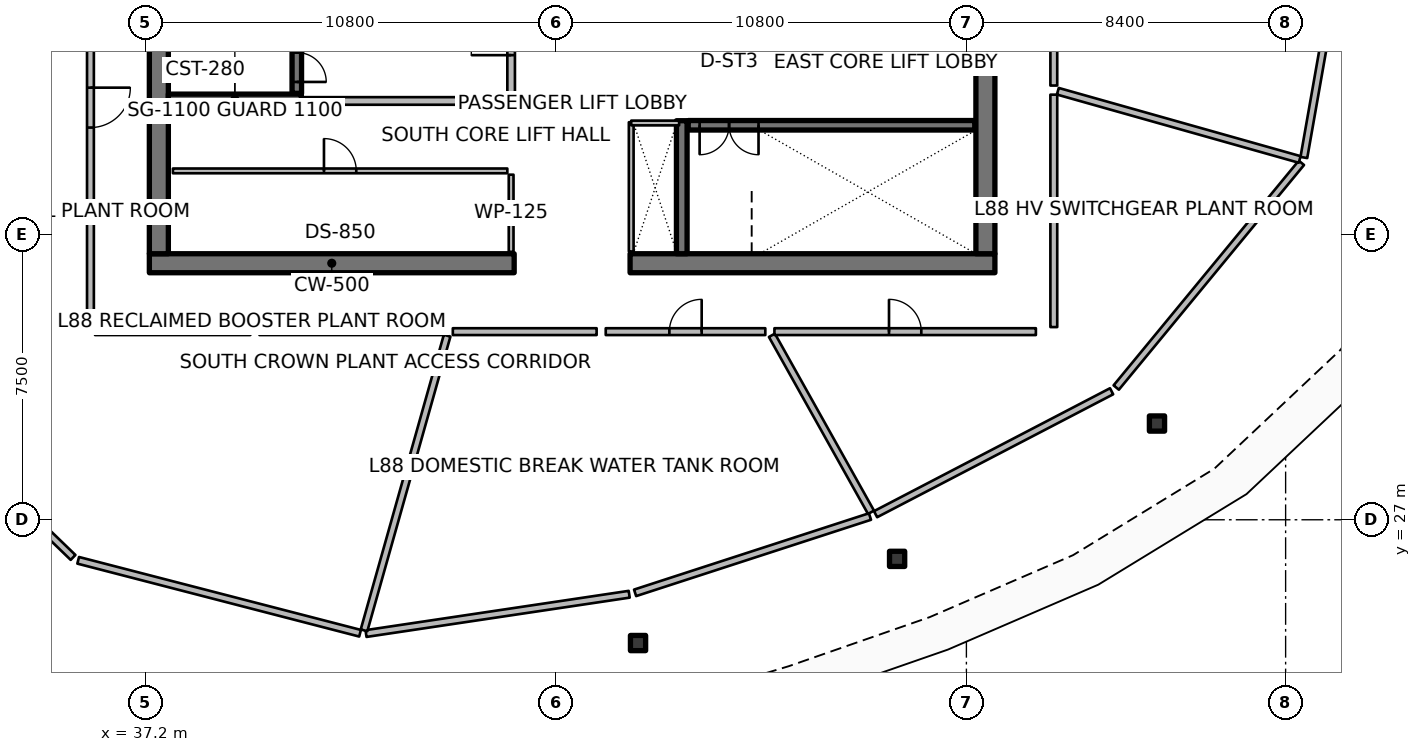
"""IFC4 building model, lengths in metres.
Left out: names, types, materials, properties, quantities, classifications, styles, units other than length and angle.
Written with IfcOpenShell. Run it as: python <this file> out.ifc"""

import sys

from ifc_helpers import new_model, si_unit, direction, frame, frame_2d, origin, origin_2d, place, context, subcontext, project, spatial, rectangle, hollow_rectangle, extrude, element, fill, save


model = new_model("IFC4")
c1 = context("Model", 3, precision=1e-05, world=origin(), true_north=direction((0.0, 1.0)))
c2 = subcontext(c1, "Body", "Model", "MODEL_VIEW")
j1 = project(units=[si_unit("LENGTHUNIT", "METRE"), si_unit("PLANEANGLEUNIT", "RADIAN")], contexts=[c1])
p1 = place(None, origin())
s1 = spatial("IfcSite", under=j1, at=p1, CompositionType="ELEMENT")
p2 = place(p1, origin())
s2 = spatial("IfcBuilding", under=s1, at=p2, CompositionType="ELEMENT")
p3 = place(p2, frame((0.0, 0.0, 351.5)))
s3 = spatial("IfcBuildingStorey", under=s2, at=p3, CompositionType="ELEMENT", Elevation=351.5)
p4 = place(p3, frame((37.3, 33.75, 0.0), z_axis=(0.0, 0.0, 1.0), x_axis=(1.0, 0.0, 0.0)))
e1 = element("IfcWall", 1, at=p4, inside=s3, PredefinedType="SHEAR", context=c2, shape_type="SweptSolid", body=[
    extrude(rectangle(XDim=9.6, YDim=0.5, at=frame_2d((4.8, 0.0))), origin(), (0.0, 0.0, 1.0), 4.5),
])
p5 = place(p3, frame((49.95, 33.75, 0.0), z_axis=(0.0, 0.0, 1.0), x_axis=(1.0, 0.0, 0.0)))
e2 = element("IfcWall", 2, at=p5, inside=s3, PredefinedType="SHEAR", context=c2, shape_type="SweptSolid", body=[
    extrude(rectangle(XDim=9.6, YDim=0.5, at=frame_2d((4.8, 0.0))), origin(), (0.0, 0.0, 1.0), 4.5),
])
for number, where, z_axis, x_axis in (
    (3, (37.55, 34.0, 0.0), (0.0, 0.0, 1.0), (0.0, 1.0, 0.0)),
    (4, (59.3, 34.0, 0.0), (0.0, 0.0, 1.0), (0.0, 1.0, 0.0)),
):
    element("IfcWall", number, at=place(p3, frame(where, z_axis=z_axis, x_axis=x_axis)), inside=s3, PredefinedType="SHEAR", context=c2, shape_type="SweptSolid", body=[
        extrude(rectangle(XDim=16.0, YDim=0.5, at=frame_2d((8.0, 0.0))), origin(), (0.0, 0.0, 1.0), 4.5),
    ])
for number, where, z_axis, x_axis in (
    (5, (37.8, 38.06, 0.0), (0.0, 0.0, 1.0), (1.0, 0.0, 0.0)),
    (6, (51.31, 34.0, 0.0), (0.0, 0.0, 1.0), (0.0, 1.0, 0.0)),
):
    element("IfcWall", number, at=place(p3, frame(where, z_axis=z_axis, x_axis=x_axis)), inside=s3, PredefinedType="SHEAR", context=c2, shape_type="SweptSolid", body=[
        extrude(rectangle(XDim=3.5, YDim=0.28, at=frame_2d((1.75, 0.0))), origin(), (0.0, 0.0, 1.0), 4.5),
    ])
for number, where, z_axis, x_axis in (
    (7, (50.159, 23.756, 0.0), (0.0, 0.0, 1.0), (1.0, 0.0, 0.0)),
    (8, (56.977, 25.971, 0.0), (0.0, 0.0, 1.0), (1.0, 0.0, 0.0)),
    (9, (63.815, 29.532, 0.0), (0.0, 0.0, 1.0), (1.0, 0.0, 0.0)),
):
    element("IfcColumn", number, at=place(p3, frame(where, z_axis=z_axis, x_axis=x_axis)), inside=s3, PredefinedType="COLUMN", context=c2, shape_type="SweptSolid", body=[
        extrude(hollow_rectangle(XDim=0.4, YDim=0.4, WallThickness=0.02, InnerFilletRadius=0.02, OuterFilletRadius=0.04, at=origin_2d()), origin(), (0.0, 0.0, 1.0), 4.22),
    ])
p6 = place(p3, frame((41.18, 38.22, 0.0), z_axis=(0.0, 0.0, 1.0), x_axis=(0.0, 1.0, 0.0)))
e10 = element("IfcWall", 10, at=p6, inside=s3, PredefinedType="SOLIDWALL", context=c2, shape_type="SweptSolid", body=[
    extrude(rectangle(XDim=7.56, YDim=0.25, at=frame_2d((3.78, 0.0))), origin(), (0.0, 0.0, 1.0), 4.22),
])
p7 = place(p6, frame((0.3, 0.0, 0.0)))
e11 = element("IfcOpeningElement", 11, at=p7, cuts=e10, PredefinedType="OPENING", context=c2, shape_type="SweptSolid", body=[
    extrude(rectangle(XDim=1.55, YDim=2.15, at=frame_2d((0.775, 1.075))), frame((0.0, 0.135, 0.0), z_axis=(0.0, -1.0, 0.0), x_axis=(1.0, 0.0, 0.0)), (0.0, 0.0, 1.0), 0.27),
])
p8 = place(p3, frame((51.48, 37.38, 0.0), z_axis=(0.0, 0.0, 1.0), x_axis=(1.0, 0.0, 0.0)))
e12 = element("IfcWall", 12, at=p8, inside=s3, PredefinedType="SOLIDWALL", context=c2, shape_type="SweptSolid", body=[
    extrude(rectangle(XDim=7.54, YDim=0.25, at=frame_2d((3.77, 0.0))), origin(), (0.0, 0.0, 1.0), 4.22),
])
p9 = place(p8, frame((0.3, 0.0, 0.0)))
e13 = element("IfcOpeningElement", 13, at=p9, cuts=e12, PredefinedType="OPENING", context=c2, shape_type="SweptSolid", body=[
    extrude(rectangle(XDim=1.55, YDim=2.15, at=frame_2d((0.775, 1.075))), frame((0.0, 0.135, 0.0), z_axis=(0.0, -1.0, 0.0), x_axis=(1.0, 0.0, 0.0)), (0.0, 0.0, 1.0), 0.27),
])
p10 = place(p3, frame((46.82, 34.05, 0.0), z_axis=(0.0, 0.0, 1.0), x_axis=(0.0, 1.0, 0.0)))
e14 = element("IfcWall", 14, at=p10, inside=s3, PredefinedType="PARTITIONING", context=c2, shape_type="SweptSolid", body=[
    extrude(rectangle(XDim=2.03, YDim=0.125, at=frame_2d((1.015, 0.0))), origin(), (0.0, 0.0, 1.0), 3.66),
])
p11 = place(p3, frame((37.92, 36.18, 0.0), z_axis=(0.0, 0.0, 1.0), x_axis=(1.0, 0.0, 0.0)))
e15 = element("IfcWall", 15, at=p11, inside=s3, PredefinedType="PARTITIONING", context=c2, shape_type="SweptSolid", body=[
    extrude(rectangle(XDim=8.8, YDim=0.125, at=frame_2d((4.4, 0.0))), origin(), (0.0, 0.0, 1.0), 3.66),
])
p12 = place(p11, frame((3.975, 0.0, 0.0)))
e16 = element("IfcOpeningElement", 16, at=p12, cuts=e15, PredefinedType="OPENING", context=c2, shape_type="SweptSolid", body=[
    extrude(rectangle(XDim=0.85, YDim=2.06, at=frame_2d((0.425, 1.03))), frame((0.0, 0.073, 0.0), z_axis=(0.0, -1.0, 0.0), x_axis=(1.0, 0.0, 0.0)), (0.0, 0.0, 1.0), 0.145),
])
p13 = place(p3, frame((41.35, 38.02, 0.0), z_axis=(0.0, 0.0, 1.0), x_axis=(1.0, 0.0, 0.0)))
e17 = element("IfcWall", 17, at=p13, inside=s3, PredefinedType="PARTITIONING", context=c2, shape_type="SweptSolid", body=[
    extrude(rectangle(XDim=5.37, YDim=0.2, at=frame_2d((2.685, 0.0))), origin(), (0.0, 0.0, 1.0), 4.22),
])
p14 = place(p3, frame((46.82, 38.12, 0.0), z_axis=(0.0, 0.0, 1.0), x_axis=(0.0, 1.0, 0.0)))
e18 = element("IfcWall", 18, at=p14, inside=s3, PredefinedType="PARTITIONING", context=c2, shape_type="SweptSolid", body=[
    extrude(rectangle(XDim=3.26, YDim=0.2, at=frame_2d((1.63, 0.0))), origin(), (0.0, 0.0, 1.0), 4.22),
])
p15 = place(p14, frame((1.105, 0.0, 0.0)))
e19 = element("IfcOpeningElement", 19, at=p15, cuts=e18, PredefinedType="OPENING", context=c2, shape_type="SweptSolid", body=[
    extrude(rectangle(XDim=1.05, YDim=2.1, at=frame_2d((0.525, 1.05))), frame((0.0, 0.11, 0.0), z_axis=(0.0, -1.0, 0.0), x_axis=(1.0, 0.0, 0.0)), (0.0, 0.0, 1.0), 0.22),
])
p16 = place(p3, frame((49.98, 34.06, 0.0), z_axis=(0.0, 0.0, 1.0), x_axis=(0.0, 1.0, 0.0)))
e20 = element("IfcWall", 20, at=p16, inside=s3, PredefinedType="PARTITIONING", context=c2, shape_type="SweptSolid", body=[
    extrude(rectangle(XDim=3.4, YDim=0.125, at=frame_2d((1.7, 0.0))), origin(), (0.0, 0.0, 1.0), 3.66),
])
p17 = place(p3, frame((49.98, 37.44, 0.0), z_axis=(0.0, 0.0, 1.0), x_axis=(1.0, 0.0, 0.0)))
e21 = element("IfcWall", 21, at=p17, inside=s3, PredefinedType="PARTITIONING", context=c2, shape_type="SweptSolid", body=[
    extrude(rectangle(XDim=1.26, YDim=0.125, at=frame_2d((0.63, 0.0))), origin(), (0.0, 0.0, 1.0), 3.66),
])
p18 = place(p3, frame((29.533, 31.57, 0.0), z_axis=(0.0, 0.0, 1.0), x_axis=(0.719364153135, -0.694633151516, 0.0)))
e22 = element("IfcWall", 22, at=p18, inside=s3, PredefinedType="PARTITIONING", context=c2, shape_type="SweptSolid", body=[
    extrude(rectangle(XDim=8.006, YDim=0.18, at=frame_2d((4.003, 0.0))), origin(), (0.0, 0.0, 1.0), 3.213),
])
p19 = place(p3, frame((35.427, 25.934, 0.0), z_axis=(0.0, 0.0, 1.0), x_axis=(0.968117205342, -0.250497658115, 0.0)))
e23 = element("IfcWall", 23, at=p19, inside=s3, PredefinedType="PARTITIONING", context=c2, shape_type="SweptSolid", body=[
    extrude(rectangle(XDim=7.662, YDim=0.18, at=frame_2d((3.831, 0.0))), origin(), (0.0, 0.0, 1.0), 3.213),
])
p20 = place(p3, frame((43.001, 24.006, 0.0), z_axis=(0.0, 0.0, 1.0), x_axis=(0.989034336252, 0.147685753256, 0.0)))
e24 = element("IfcWall", 24, at=p20, inside=s3, PredefinedType="PARTITIONING", context=c2, shape_type="SweptSolid", body=[
    extrude(rectangle(XDim=7.003, YDim=0.18, at=frame_2d((3.501, 0.0))), origin(), (0.0, 0.0, 1.0), 3.213),
])
p21 = place(p3, frame((50.082, 25.077, 0.0), z_axis=(0.0, 0.0, 1.0), x_axis=(0.95105283999, 0.309028308649, 0.0)))
e25 = element("IfcWall", 25, at=p21, inside=s3, PredefinedType="PARTITIONING", context=c2, shape_type="SweptSolid", body=[
    extrude(rectangle(XDim=6.499, YDim=0.18, at=frame_2d((3.25, 0.0))), origin(), (0.0, 0.0, 1.0), 3.213),
])
p22 = place(p3, frame((56.41, 27.147, 0.0), z_axis=(0.0, 0.0, 1.0), x_axis=(0.886949494865, 0.461866423935, 0.0)))
e26 = element("IfcWall", 26, at=p22, inside=s3, PredefinedType="PARTITIONING", context=c2, shape_type="SweptSolid", body=[
    extrude(rectangle(XDim=7.002, YDim=0.18, at=frame_2d((3.501, 0.0))), origin(), (0.0, 0.0, 1.0), 3.213),
])
p23 = place(p3, frame((62.742, 30.48, 0.0), z_axis=(0.0, 0.0, 1.0), x_axis=(0.636018833443, 0.771673534278, 0.0)))
e27 = element("IfcWall", 27, at=p23, inside=s3, PredefinedType="PARTITIONING", context=c2, shape_type="SweptSolid", body=[
    extrude(rectangle(XDim=7.661, YDim=0.18, at=frame_2d((3.831, 0.0))), origin(), (0.0, 0.0, 1.0), 3.213),
])
p24 = place(p3, frame((67.68, 36.532, 0.0), z_axis=(0.0, 0.0, 1.0), x_axis=(0.173668776466, 0.984804120666, 0.0)))
e28 = element("IfcWall", 28, at=p24, inside=s3, PredefinedType="PARTITIONING", context=c2, shape_type="SweptSolid", body=[
    extrude(rectangle(XDim=8.006, YDim=0.18, at=frame_2d((4.003, 0.0))), origin(), (0.0, 0.0, 1.0), 3.213),
])
p25 = place(p3, frame((35.75, 40.43, 0.0), z_axis=(0.0, 0.0, 1.0), x_axis=(0.0, -1.0, 0.0)))
e29 = element("IfcWall", 29, at=p25, inside=s3, PredefinedType="PARTITIONING", context=c2, shape_type="SweptSolid", body=[
    extrude(rectangle(XDim=5.17, YDim=0.18, at=frame_2d((2.585, 0.0))), origin(), (0.0, 0.0, 1.0), 3.213),
])
p26 = place(p25, frame((2.06, 0.0, 0.0)))
e30 = element("IfcOpeningElement", 30, at=p26, cuts=e29, PredefinedType="OPENING", context=c2, shape_type="SweptSolid", body=[
    extrude(rectangle(XDim=1.05, YDim=2.1, at=frame_2d((0.525, 1.05))), frame((0.0, 0.1, 0.0), z_axis=(0.0, -1.0, 0.0), x_axis=(1.0, 0.0, 0.0)), (0.0, 0.0, 1.0), 0.2),
])
p27 = place(p3, frame((35.75, 35.02, 0.0), z_axis=(0.0, 0.0, 1.0), x_axis=(0.0, -1.0, 0.0)))
e31 = element("IfcWall", 31, at=p27, inside=s3, PredefinedType="PARTITIONING", context=c2, shape_type="SweptSolid", body=[
    extrude(rectangle(XDim=2.95, YDim=0.18, at=frame_2d((1.475, 0.0))), origin(), (0.0, 0.0, 1.0), 3.213),
])
p28 = place(p3, frame((35.87, 31.95, 0.0), z_axis=(0.0, 0.0, 1.0), x_axis=(1.0, 0.0, 0.0)))
e32 = element("IfcWall", 32, at=p28, inside=s3, PredefinedType="PARTITIONING", context=c2, shape_type="SweptSolid", body=[
    extrude(rectangle(XDim=4.087, YDim=0.18, at=frame_2d((2.043, 0.0))), origin(), (0.0, 0.0, 1.0), 3.213),
])
p29 = place(p3, frame((40.197, 31.95, 0.0), z_axis=(0.0, 0.0, 1.0), x_axis=(1.0, 0.0, 0.0)))
e33 = element("IfcWall", 33, at=p29, inside=s3, PredefinedType="PARTITIONING", context=c2, shape_type="SweptSolid", body=[
    extrude(rectangle(XDim=4.848, YDim=0.18, at=frame_2d((2.424, 0.0))), origin(), (0.0, 0.0, 1.0), 3.213),
])
p30 = place(p3, frame((45.136, 31.844, 0.0), z_axis=(0.0, 0.0, 1.0), x_axis=(-0.271457285698, -0.962450488099, 0.0)))
e34 = element("IfcWall", 34, at=p30, inside=s3, PredefinedType="PARTITIONING", context=c2, shape_type="SweptSolid", body=[
    extrude(rectangle(XDim=8.056, YDim=0.18, at=frame_2d((4.028, 0.0))), origin(), (0.0, 0.0, 1.0), 3.213),
])
p31 = place(p3, frame((45.286, 31.95, 0.0), z_axis=(0.0, 0.0, 1.0), x_axis=(1.0, 0.0, 0.0)))
e35 = element("IfcWall", 35, at=p31, inside=s3, PredefinedType="PARTITIONING", context=c2, shape_type="SweptSolid", body=[
    extrude(rectangle(XDim=3.784, YDim=0.18, at=frame_2d((1.892, 0.0))), origin(), (0.0, 0.0, 1.0), 3.213),
])
p32 = place(p3, frame((49.31, 31.95, 0.0), z_axis=(0.0, 0.0, 1.0), x_axis=(1.0, 0.0, 0.0)))
e36 = element("IfcWall", 36, at=p32, inside=s3, PredefinedType="PARTITIONING", context=c2, shape_type="SweptSolid", body=[
    extrude(rectangle(XDim=4.199, YDim=0.18, at=frame_2d((2.099, 0.0))), origin(), (0.0, 0.0, 1.0), 3.213),
])
p33 = place(p32, frame((1.674, 0.0, 0.0)))
e37 = element("IfcOpeningElement", 37, at=p33, cuts=e36, PredefinedType="OPENING", context=c2, shape_type="SweptSolid", body=[
    extrude(rectangle(XDim=0.85, YDim=2.06, at=frame_2d((0.425, 1.03))), frame((0.0, 0.1, 0.0), z_axis=(0.0, -1.0, 0.0), x_axis=(1.0, 0.0, 0.0)), (0.0, 0.0, 1.0), 0.2),
])
p34 = place(p3, frame((53.682, 31.854, 0.0), z_axis=(0.0, 0.0, 1.0), x_axis=(0.488622869326, -0.872495095443, 0.0)))
e38 = element("IfcWall", 38, at=p34, inside=s3, PredefinedType="PARTITIONING", context=c2, shape_type="SweptSolid", body=[
    extrude(rectangle(XDim=5.337, YDim=0.18, at=frame_2d((2.668, 0.0))), origin(), (0.0, 0.0, 1.0), 3.213),
])
p35 = place(p3, frame((53.748, 31.95, 0.0), z_axis=(0.0, 0.0, 1.0), x_axis=(1.0, 0.0, 0.0)))
e39 = element("IfcWall", 39, at=p35, inside=s3, PredefinedType="PARTITIONING", context=c2, shape_type="SweptSolid", body=[
    extrude(rectangle(XDim=6.88, YDim=0.18, at=frame_2d((3.44, 0.0))), origin(), (0.0, 0.0, 1.0), 3.213),
])
p36 = place(p35, frame((3.015, 0.0, 0.0)))
e40 = element("IfcOpeningElement", 40, at=p36, cuts=e39, PredefinedType="OPENING", context=c2, shape_type="SweptSolid", body=[
    extrude(rectangle(XDim=0.85, YDim=2.06, at=frame_2d((0.425, 1.03))), frame((0.0, 0.1, 0.0), z_axis=(0.0, -1.0, 0.0), x_axis=(1.0, 0.0, 0.0)), (0.0, 0.0, 1.0), 0.2),
])
p37 = place(p3, frame((61.1, 32.07, 0.0), z_axis=(0.0, 0.0, 1.0), x_axis=(0.0, 1.0, 0.0)))
e41 = element("IfcWall", 41, at=p37, inside=s3, PredefinedType="PARTITIONING", context=c2, shape_type="SweptSolid", body=[
    extrude(rectangle(XDim=6.115, YDim=0.18, at=frame_2d((3.058, 0.0))), origin(), (0.0, 0.0, 1.0), 3.213),
])
p38 = place(p3, frame((61.206, 38.275, 0.0), z_axis=(0.0, 0.0, 1.0), x_axis=(0.962461547865, -0.271418070294, 0.0)))
e42 = element("IfcWall", 42, at=p38, inside=s3, PredefinedType="PARTITIONING", context=c2, shape_type="SweptSolid", body=[
    extrude(rectangle(XDim=6.612, YDim=0.18, at=frame_2d((3.306, 0.0))), origin(), (0.0, 0.0, 1.0), 3.213),
])
p39 = place(p3, frame((61.1, 38.425, 0.0), z_axis=(0.0, 0.0, 1.0), x_axis=(0.0, 1.0, 0.0)))
e43 = element("IfcWall", 43, at=p39, inside=s3, PredefinedType="PARTITIONING", context=c2, shape_type="SweptSolid", body=[
    extrude(rectangle(XDim=5.005, YDim=0.18, at=frame_2d((2.502, 0.0))), origin(), (0.0, 0.0, 1.0), 3.213),
])
p40 = place(p7, origin())
e44 = element("IfcDoor", 44, at=p40, inside=s3, OperationType="DOUBLE_DOOR_SINGLE_SWING", PredefinedType="DOOR", context=c2, shape_type="SweptSolid", body=[
    extrude(rectangle(XDim=1.55, YDim=2.15, at=frame_2d((0.775, 1.075))), frame((0.0, 0.025, 0.0), z_axis=(0.0, -1.0, 0.0), x_axis=(1.0, 0.0, 0.0)), (0.0, 0.0, 1.0), 0.05),
])
fill(e11, e44)
p41 = place(p9, origin())
e45 = element("IfcDoor", 45, at=p41, inside=s3, OperationType="DOUBLE_DOOR_SINGLE_SWING", PredefinedType="DOOR", context=c2, shape_type="SweptSolid", body=[
    extrude(rectangle(XDim=1.55, YDim=2.15, at=frame_2d((0.775, 1.075))), frame((0.0, 0.025, 0.0), z_axis=(0.0, -1.0, 0.0), x_axis=(1.0, 0.0, 0.0)), (0.0, 0.0, 1.0), 0.05),
])
fill(e13, e45)
p42 = place(p12, origin())
e46 = element("IfcDoor", 46, at=p42, inside=s3, OperationType="SINGLE_SWING_LEFT", PredefinedType="DOOR", context=c2, shape_type="SweptSolid", body=[
    extrude(rectangle(XDim=0.85, YDim=2.06, at=frame_2d((0.425, 1.03))), frame((0.0, 0.025, 0.0), z_axis=(0.0, -1.0, 0.0), x_axis=(1.0, 0.0, 0.0)), (0.0, 0.0, 1.0), 0.05),
])
fill(e16, e46)
p43 = place(p15, origin())
e47 = element("IfcDoor", 47, at=p43, inside=s3, OperationType="SINGLE_SWING_LEFT", PredefinedType="DOOR", context=c2, shape_type="SweptSolid", body=[
    extrude(rectangle(XDim=1.05, YDim=2.1, at=frame_2d((0.525, 1.05))), frame((0.0, 0.025, 0.0), z_axis=(0.0, -1.0, 0.0), x_axis=(1.0, 0.0, 0.0)), (0.0, 0.0, 1.0), 0.05),
])
fill(e19, e47)
p44 = place(p26, origin())
e48 = element("IfcDoor", 48, at=p44, inside=s3, OperationType="SINGLE_SWING_LEFT", PredefinedType="DOOR", context=c2, shape_type="SweptSolid", body=[
    extrude(rectangle(XDim=1.05, YDim=2.1, at=frame_2d((0.525, 1.05))), frame((0.0, 0.025, 0.0), z_axis=(0.0, -1.0, 0.0), x_axis=(1.0, 0.0, 0.0)), (0.0, 0.0, 1.0), 0.05),
])
fill(e30, e48)
p45 = place(p33, origin())
e49 = element("IfcDoor", 49, at=p45, inside=s3, OperationType="SINGLE_SWING_RIGHT", PredefinedType="DOOR", context=c2, shape_type="SweptSolid", body=[
    extrude(rectangle(XDim=0.85, YDim=2.06, at=frame_2d((0.425, 1.03))), frame((0.0, 0.025, 0.0), z_axis=(0.0, -1.0, 0.0), x_axis=(1.0, 0.0, 0.0)), (0.0, 0.0, 1.0), 0.05),
])
fill(e37, e49)
p46 = place(p36, origin())
e50 = element("IfcDoor", 50, at=p46, inside=s3, OperationType="SINGLE_SWING_LEFT", PredefinedType="DOOR", context=c2, shape_type="SweptSolid", body=[
    extrude(rectangle(XDim=0.85, YDim=2.06, at=frame_2d((0.425, 1.03))), frame((0.0, 0.025, 0.0), z_axis=(0.0, -1.0, 0.0), x_axis=(1.0, 0.0, 0.0)), (0.0, 0.0, 1.0), 0.05),
])
fill(e40, e50)
save(model, sys.argv[1])
